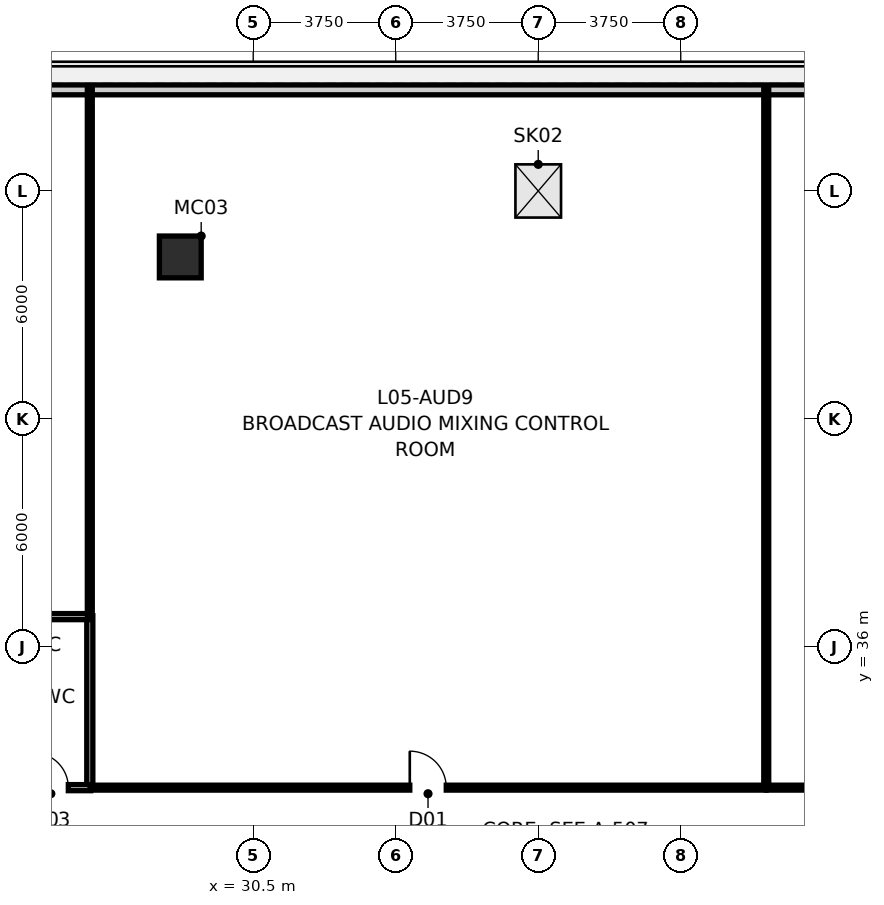
"""IFC4 building model, lengths in metres.
Left out: names, types, materials, properties, quantities, classifications, styles, units other than length and angle.
Written with IfcOpenShell. Run it as: python <this file> out.ifc"""

import sys

from ifc_helpers import new_model, si_unit, direction, frame, frame_2d, origin, origin_2d, place, context, subcontext, project, spatial, rectangle, hollow_rectangle, extrude, source, transform, mapped, element, fill, save


model = new_model("IFC4")
c1 = context("Model", 3, precision=1e-05, world=origin(), true_north=direction((0.0, 1.0)))
c2 = subcontext(c1, "Body", "Model", "MODEL_VIEW")
j1 = project(units=[si_unit("LENGTHUNIT", "METRE"), si_unit("PLANEANGLEUNIT", "RADIAN")], contexts=[c1])
p1 = place(None, origin())
s1 = spatial("IfcSite", under=j1, at=p1, CompositionType="ELEMENT")
p2 = place(p1, origin())
s2 = spatial("IfcBuilding", under=s1, at=p2, CompositionType="ELEMENT")
p3 = place(p2, frame((0.0, 0.0, 23.1)))
s3 = spatial("IfcBuildingStorey", under=s2, at=p3, CompositionType="ELEMENT", Elevation=23.1)
m1 = source(origin(), c2, "Body", "SweptSolid", [
    extrude(hollow_rectangle(XDim=1.1, YDim=1.1, WallThickness=0.06, at=origin_2d()), origin(), (0.0, 0.0, 1.0), 4.501),
])
p4 = place(p3, frame((28.581, 46.264, 0.0), z_axis=(0.023864693146, 0.001735614047, 0.999713691046), x_axis=(-0.072535695779, 0.997365816959, 0.0)))
e1 = element("IfcColumn", 1, at=p4, inside=s3, PredefinedType="COLUMN", context=c2, shape_type="MappedRepresentation", body=[
    mapped(m1, transform((0.0, 0.0, 0.0), scale=1.0)),
])
p5 = place(p3, frame((13.061, 50.66, 0.0), z_axis=(0.0, 0.0, 1.0), x_axis=(1.0, 0.0, 0.0)))
e2 = element("IfcWall", 2, at=p5, inside=s3, PredefinedType="STANDARD", context=c2, shape_type="SweptSolid", body=[
    extrude(rectangle(XDim=49.878, YDim=0.26, at=frame_2d((24.939, 0.0))), origin(), (0.0, 0.0, 1.0), 4.25),
])
p6 = place(p3, frame((26.2, 32.275, 0.0), z_axis=(0.0, 0.0, 1.0), x_axis=(0.0, 1.0, 0.0)))
e3 = element("IfcWall", 3, at=p6, inside=s3, PredefinedType="PLUMBINGWALL", context=c2, shape_type="SweptSolid", body=[
    extrude(rectangle(XDim=4.55, YDim=0.16, at=frame_2d((2.275, 0.0))), origin(), (0.0, 0.0, 1.0), 4.25),
])
p7 = place(p3, frame((22.375, 32.3, 0.0), z_axis=(0.0, 0.0, 1.0), x_axis=(1.0, 0.0, 0.0)))
e4 = element("IfcWall", 4, at=p7, inside=s3, PredefinedType="PLUMBINGWALL", context=c2, shape_type="SweptSolid", body=[
    extrude(rectangle(XDim=3.85, YDim=0.16, at=frame_2d((1.925, 0.0))), origin(), (0.0, 0.0, 1.0), 4.25),
])
p8 = place(p7, frame((2.34, 0.0, 0.0)))
e5 = element("IfcOpeningElement", 5, at=p8, cuts=e4, PredefinedType="OPENING", context=c2, shape_type="SweptSolid", body=[
    extrude(rectangle(XDim=0.92, YDim=2.1, at=frame_2d((0.46, 1.05))), frame((0.0, 0.092, 0.0), z_axis=(0.0, -1.0, 0.0), x_axis=(1.0, 0.0, 0.0)), (0.0, 0.0, 1.0), 0.184),
])
p9 = place(p3, frame((22.375, 36.8, 0.0), z_axis=(0.0, 0.0, 1.0), x_axis=(1.0, 0.0, 0.0)))
e6 = element("IfcWall", 6, at=p9, inside=s3, PredefinedType="PLUMBINGWALL", context=c2, shape_type="SweptSolid", body=[
    extrude(rectangle(XDim=3.85, YDim=0.16, at=frame_2d((1.925, 0.0))), origin(), (0.0, 0.0, 1.0), 4.25),
])
p10 = place(p3, frame((44.0, 32.305, 0.0), z_axis=(0.0, 0.0, 1.0), x_axis=(0.0, 1.0, 0.0)))
e7 = element("IfcWall", 7, at=p10, inside=s3, PredefinedType="PARTITIONING", context=c2, shape_type="SweptSolid", body=[
    extrude(rectangle(XDim=18.365, YDim=0.13, at=frame_2d((9.183, 0.0))), origin(), (0.0, 0.0, 1.0), 4.25),
])
p11 = place(p3, frame((26.205, 32.3, 0.0), z_axis=(0.0, 0.0, 1.0), x_axis=(1.0, 0.0, 0.0)))
e8 = element("IfcWall", 8, at=p11, inside=s3, PredefinedType="PARTITIONING", context=c2, shape_type="SweptSolid", body=[
    extrude(rectangle(XDim=17.79, YDim=0.13, at=frame_2d((8.895, 0.0))), origin(), (0.0, 0.0, 1.0), 4.25),
])
p12 = place(p11, frame((8.415, 0.0, 0.0)))
e9 = element("IfcOpeningElement", 9, at=p12, cuts=e8, PredefinedType="OPENING", context=c2, shape_type="SweptSolid", body=[
    extrude(rectangle(XDim=0.96, YDim=2.15, at=frame_2d((0.48, 1.075))), frame((0.0, 0.077, 0.0), z_axis=(0.0, -1.0, 0.0), x_axis=(1.0, 0.0, 0.0)), (0.0, 0.0, 1.0), 0.154),
])
p13 = place(p3, frame((26.2, 36.805, 0.0), z_axis=(0.0, 0.0, 1.0), x_axis=(0.0, 1.0, 0.0)))
e10 = element("IfcWall", 10, at=p13, inside=s3, PredefinedType="PARTITIONING", context=c2, shape_type="SweptSolid", body=[
    extrude(rectangle(XDim=13.865, YDim=0.13, at=frame_2d((6.933, 0.0))), origin(), (0.0, 0.0, 1.0), 4.25),
])
p14 = place(p3, frame((44.005, 32.3, 0.0), z_axis=(0.0, 0.0, 1.0), x_axis=(1.0, 0.0, 0.0)))
e11 = element("IfcWall", 11, at=p14, inside=s3, PredefinedType="PARTITIONING", context=c2, shape_type="SweptSolid", body=[
    extrude(rectangle(XDim=8.49, YDim=0.13, at=frame_2d((4.245, 0.0))), origin(), (0.0, 0.0, 1.0), 4.25),
])
p15 = place(p14, frame((3.765, 0.0, 0.0)))
e12 = element("IfcOpeningElement", 12, at=p15, cuts=e11, PredefinedType="OPENING", context=c2, shape_type="SweptSolid", body=[
    extrude(rectangle(XDim=0.96, YDim=2.15, at=frame_2d((0.48, 1.075))), frame((0.0, 0.077, 0.0), z_axis=(0.0, -1.0, 0.0), x_axis=(1.0, 0.0, 0.0)), (0.0, 0.0, 1.0), 0.154),
])
p16 = place(p3, frame((0.0, 0.0, -0.45)))
p17 = place(p16, frame((38.0, 48.0, 0.0)))
p18 = place(p17, frame((0.0, 0.0, 0.4)))
e13 = element("IfcWindow", 13, at=p18, inside=s3, PartitioningType="SINGLE_PANEL", PredefinedType="SKYLIGHT", context=c2, shape_type="SweptSolid", body=[
    extrude(rectangle(XDim=1.2, YDim=1.4, at=origin_2d()), origin(), (0.0, 0.0, 1.0), 0.05),
])
p19 = place(p8, origin())
e14 = element("IfcDoor", 14, at=p19, inside=s3, OperationType="SINGLE_SWING_LEFT", PredefinedType="DOOR", context=c2, shape_type="SweptSolid", body=[
    extrude(rectangle(XDim=0.92, YDim=2.1, at=frame_2d((0.46, 1.05))), frame((0.0, 0.025, 0.0), z_axis=(0.0, -1.0, 0.0), x_axis=(1.0, 0.0, 0.0)), (0.0, 0.0, 1.0), 0.05),
])
fill(e5, e14)
p20 = place(p12, origin())
e15 = element("IfcDoor", 15, at=p20, inside=s3, OperationType="SINGLE_SWING_LEFT", PredefinedType="DOOR", context=c2, shape_type="SweptSolid", body=[
    extrude(rectangle(XDim=0.96, YDim=2.15, at=frame_2d((0.48, 1.075))), frame((0.0, 0.025, 0.0), z_axis=(0.0, -1.0, 0.0), x_axis=(1.0, 0.0, 0.0)), (0.0, 0.0, 1.0), 0.05),
])
fill(e9, e15)
save(model, sys.argv[1])
